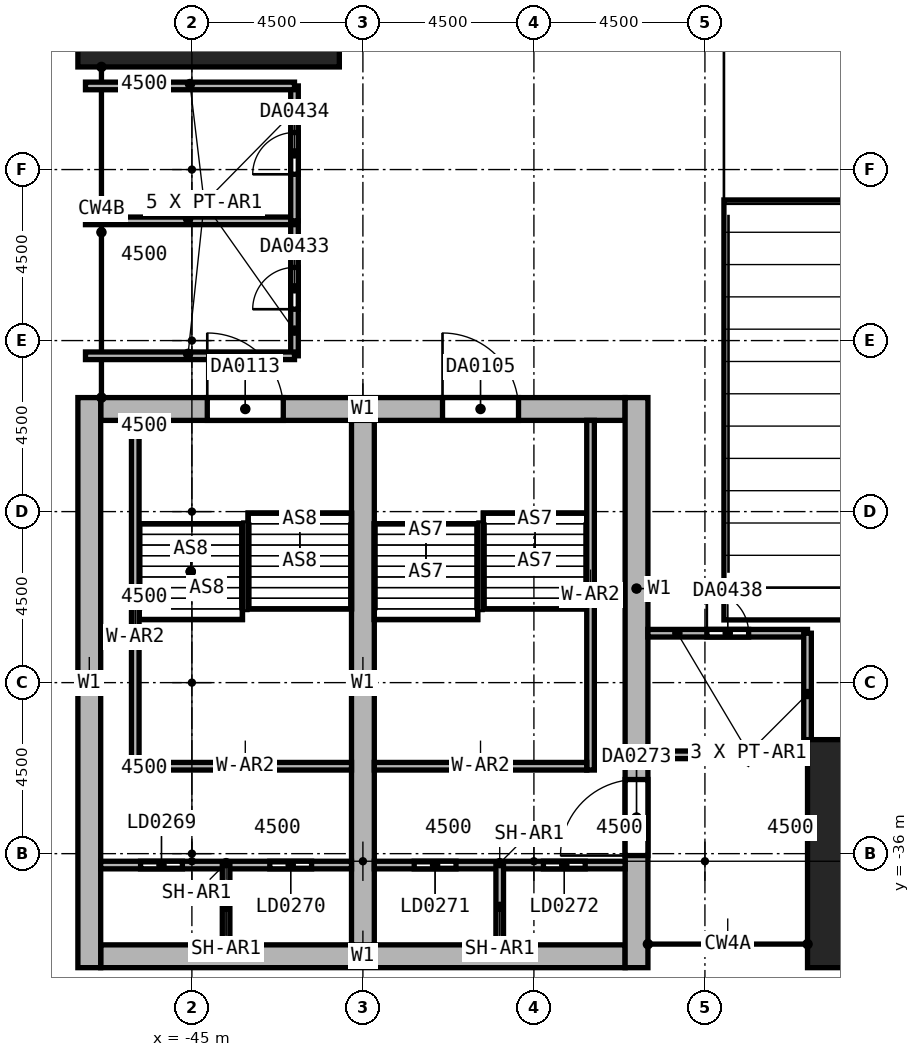
"""IFC4 building model, lengths in metres.
Left out: names, types, materials, properties, quantities, classifications, styles, units other than length and angle.
Written with IfcOpenShell. Run it as: python <this file> out.ifc"""

import sys

from ifc_helpers import new_model, si_unit, direction, frame, frame_2d, origin, origin_2d, place, context, subcontext, project, spatial, rectangle, extrude, element, fill, save


model = new_model("IFC4")
c1 = context("Model", 3, precision=1e-05, world=origin(), true_north=direction((0.0, 1.0)))
c2 = subcontext(c1, "Body", "Model", "MODEL_VIEW")
j1 = project(units=[si_unit("LENGTHUNIT", "METRE"), si_unit("PLANEANGLEUNIT", "RADIAN")], contexts=[c1])
p1 = place(None, origin())
s1 = spatial("IfcSite", under=j1, at=p1, CompositionType="ELEMENT")
p2 = place(p1, origin())
s2 = spatial("IfcBuilding", under=s1, at=p2, CompositionType="ELEMENT")
p3 = place(p2, frame((0.0, 0.0, 31.0)))
s3 = spatial("IfcBuildingStorey", under=s2, at=p3, CompositionType="ELEMENT", Elevation=31.0)
p4 = place(p3, frame((-27.0, -36.0, 0.0), z_axis=(0.0, 0.0, 1.0), x_axis=(1.0, 0.0, 0.0)))
e1 = element("IfcColumn", 1, at=p4, inside=s3, PredefinedType="COLUMN", context=c2, shape_type="SweptSolid", body=[
    extrude(rectangle(XDim=3.6, YDim=6.0, at=origin_2d()), origin(), (0.0, 0.0, 1.0), 6.0),
])
p5 = place(p3, frame((-44.56, -13.5, 0.0), z_axis=(0.0, 0.0, 1.0), x_axis=(0.0, -1.0, 0.0)))
e2 = element("IfcColumn", 2, at=p5, inside=s3, PredefinedType="COLUMN", context=c2, shape_type="SweptSolid", body=[
    extrude(rectangle(XDim=3.6, YDim=6.88, at=origin_2d()), origin(), (0.0, 0.0, 1.0), 6.0),
])
p6 = place(p3, frame((-47.4, -24.3, 0.0), z_axis=(0.0, 0.0, 1.0), x_axis=(1.0, 0.0, 0.0)))
e3 = element("IfcWall", 3, at=p6, inside=s3, PredefinedType="SHEAR", context=c2, shape_type="SweptSolid", body=[
    extrude(rectangle(XDim=13.8, YDim=0.6, at=frame_2d((6.9, 0.0))), origin(), (0.0, 0.0, 1.0), 6.0),
])
p7 = place(p6, frame((8.995, 0.0, 0.0)))
e4 = element("IfcOpeningElement", 4, at=p7, cuts=e3, PredefinedType="OPENING", context=c2, shape_type="SweptSolid", body=[
    extrude(rectangle(XDim=2.0, YDim=2.4, at=frame_2d((1.0, 1.2))), frame((0.0, 0.3, 0.0), z_axis=(0.0, -1.0, 0.0), x_axis=(1.0, 0.0, 0.0)), (0.0, 0.0, 1.0), 0.6),
])
p8 = place(p6, frame((2.805, 0.0, 0.0)))
e5 = element("IfcOpeningElement", 5, at=p8, cuts=e3, PredefinedType="OPENING", context=c2, shape_type="SweptSolid", body=[
    extrude(rectangle(XDim=2.0, YDim=2.4, at=frame_2d((1.0, 1.2))), frame((0.0, 0.3, 0.0), z_axis=(0.0, -1.0, 0.0), x_axis=(1.0, 0.0, 0.0)), (0.0, 0.0, 1.0), 0.6),
])
p9 = place(p3, frame((-47.4, -38.7, 0.0), z_axis=(0.0, 0.0, 1.0), x_axis=(1.0, 0.0, 0.0)))
e6 = element("IfcWall", 6, at=p9, inside=s3, PredefinedType="SHEAR", context=c2, shape_type="SweptSolid", body=[
    extrude(rectangle(XDim=13.8, YDim=0.6, at=frame_2d((6.9, 0.0))), origin(), (0.0, 0.0, 1.0), 6.0),
])
p10 = place(p3, frame((-47.7, -39.0, 0.0), z_axis=(0.0, 0.0, 1.0), x_axis=(0.0, 1.0, 0.0)))
e7 = element("IfcWall", 7, at=p10, inside=s3, PredefinedType="SHEAR", context=c2, shape_type="SweptSolid", body=[
    extrude(rectangle(XDim=15.0, YDim=0.6, at=frame_2d((7.5, 0.0))), origin(), (0.0, 0.0, 1.0), 6.0),
])
p11 = place(p3, frame((-33.3, -39.0, 0.0), z_axis=(0.0, 0.0, 1.0), x_axis=(0.0, 1.0, 0.0)))
e8 = element("IfcWall", 8, at=p11, inside=s3, PredefinedType="SHEAR", context=c2, shape_type="SweptSolid", body=[
    extrude(rectangle(XDim=15.0, YDim=0.6, at=frame_2d((7.5, 0.0))), origin(), (0.0, 0.0, 1.0), 6.0),
])
p12 = place(p11, frame((2.95, 0.0, 0.0)))
e9 = element("IfcOpeningElement", 9, at=p12, cuts=e8, PredefinedType="OPENING", context=c2, shape_type="SweptSolid", body=[
    extrude(rectangle(XDim=2.0, YDim=2.4, at=frame_2d((1.0, 1.2))), frame((0.0, 0.3, 0.0), z_axis=(0.0, -1.0, 0.0), x_axis=(1.0, 0.0, 0.0)), (0.0, 0.0, 1.0), 0.6),
])
p13 = place(p3, frame((-40.5, -38.4, 0.0), z_axis=(0.0, 0.0, 1.0), x_axis=(0.0, 1.0, 0.0)))
e10 = element("IfcWall", 10, at=p13, inside=s3, PredefinedType="SHEAR", context=c2, shape_type="SweptSolid", body=[
    extrude(rectangle(XDim=13.8, YDim=0.6, at=frame_2d((6.9, 0.0))), origin(), (0.0, 0.0, 1.0), 6.0),
])
p14 = place(p3, frame((-34.51, -33.8, 0.0), z_axis=(0.0, 0.0, 1.0), x_axis=(0.0, 1.0, 0.0)))
e11 = element("IfcWall", 11, at=p14, inside=s3, PredefinedType="SOLIDWALL", context=c2, shape_type="SweptSolid", body=[
    extrude(rectangle(XDim=9.2, YDim=0.2, at=frame_2d((4.6, 0.0))), origin(), (0.0, 0.0, 1.0), 6.0),
])
p15 = place(p3, frame((-40.2, -33.7, 0.0), z_axis=(0.0, 0.0, 1.0), x_axis=(1.0, 0.0, 0.0)))
e12 = element("IfcWall", 12, at=p15, inside=s3, PredefinedType="SOLIDWALL", context=c2, shape_type="SweptSolid", body=[
    extrude(rectangle(XDim=5.59, YDim=0.2, at=frame_2d((2.795, 0.0))), origin(), (0.0, 0.0, 1.0), 6.0),
])
p16 = place(p3, frame((-46.49, -33.8, 0.0), z_axis=(0.0, 0.0, 1.0), x_axis=(0.0, 1.0, 0.0)))
e13 = element("IfcWall", 13, at=p16, inside=s3, PredefinedType="SOLIDWALL", context=c2, shape_type="SweptSolid", body=[
    extrude(rectangle(XDim=9.2, YDim=0.2, at=frame_2d((4.6, 0.0))), origin(), (0.0, 0.0, 1.0), 6.0),
])
p17 = place(p3, frame((-46.39, -33.7, 0.0), z_axis=(0.0, 0.0, 1.0), x_axis=(1.0, 0.0, 0.0)))
e14 = element("IfcWall", 14, at=p17, inside=s3, PredefinedType="SOLIDWALL", context=c2, shape_type="SweptSolid", body=[
    extrude(rectangle(XDim=5.59, YDim=0.2, at=frame_2d((2.795, 0.0))), origin(), (0.0, 0.0, 1.0), 6.0),
])
p18 = place(p3, frame((-47.4, -36.3, 0.0), z_axis=(0.0, 0.0, 1.0), x_axis=(1.0, 0.0, 0.0)))
e15 = element("IfcWall", 15, at=p18, inside=s3, PredefinedType="SHEAR", context=c2, shape_type="SweptSolid", body=[
    extrude(rectangle(XDim=6.6, YDim=0.2, at=frame_2d((3.3, 0.0))), origin(), (0.0, 0.0, 1.0), 6.0),
])
p19 = place(p18, frame((1.05, 0.0, 0.0)))
e16 = element("IfcOpeningElement", 16, at=p19, cuts=e15, PredefinedType="OPENING", context=c2, shape_type="SweptSolid", body=[
    extrude(rectangle(XDim=1.1, YDim=2.4, at=frame_2d((0.55, 1.2))), frame((0.0, 0.1, 0.0), z_axis=(0.0, -1.0, 0.0), x_axis=(1.0, 0.0, 0.0)), (0.0, 0.0, 1.0), 0.2),
])
p20 = place(p18, frame((4.45, 0.0, 0.0)))
e17 = element("IfcOpeningElement", 17, at=p20, cuts=e15, PredefinedType="OPENING", context=c2, shape_type="SweptSolid", body=[
    extrude(rectangle(XDim=1.1, YDim=2.4, at=frame_2d((0.55, 1.2))), frame((0.0, 0.1, 0.0), z_axis=(0.0, -1.0, 0.0), x_axis=(1.0, 0.0, 0.0)), (0.0, 0.0, 1.0), 0.2),
])
p21 = place(p3, frame((-40.2, -36.3, 0.0), z_axis=(0.0, 0.0, 1.0), x_axis=(1.0, 0.0, 0.0)))
e18 = element("IfcWall", 18, at=p21, inside=s3, PredefinedType="SHEAR", context=c2, shape_type="SweptSolid", body=[
    extrude(rectangle(XDim=6.6, YDim=0.2, at=frame_2d((3.3, 0.0))), origin(), (0.0, 0.0, 1.0), 6.0),
])
p22 = place(p21, frame((1.05, 0.0, 0.0)))
e19 = element("IfcOpeningElement", 19, at=p22, cuts=e18, PredefinedType="OPENING", context=c2, shape_type="SweptSolid", body=[
    extrude(rectangle(XDim=1.1, YDim=2.4, at=frame_2d((0.55, 1.2))), frame((0.0, 0.1, 0.0), z_axis=(0.0, -1.0, 0.0), x_axis=(1.0, 0.0, 0.0)), (0.0, 0.0, 1.0), 0.2),
])
p23 = place(p21, frame((4.45, 0.0, 0.0)))
e20 = element("IfcOpeningElement", 20, at=p23, cuts=e18, PredefinedType="OPENING", context=c2, shape_type="SweptSolid", body=[
    extrude(rectangle(XDim=1.1, YDim=2.4, at=frame_2d((0.55, 1.2))), frame((0.0, 0.1, 0.0), z_axis=(0.0, -1.0, 0.0), x_axis=(1.0, 0.0, 0.0)), (0.0, 0.0, 1.0), 0.2),
])
for number, where, z_axis, x_axis in (
    (21, (-36.9, -38.4, 0.0), (0.0, 0.0, 1.0), (0.0, 1.0, 0.0)),
    (22, (-44.1, -38.4, 0.0), (0.0, 0.0, 1.0), (0.0, 1.0, 0.0)),
):
    element("IfcWall", number, at=place(p3, frame(where, z_axis=z_axis, x_axis=x_axis)), inside=s3, PredefinedType="SHEAR", context=c2, shape_type="SweptSolid", body=[
        extrude(rectangle(XDim=2.1, YDim=0.2, at=frame_2d((1.05, 0.0))), origin(), (0.0, 0.0, 1.0), 6.0),
    ])
p24 = place(p3, frame((-42.3, -22.9, 0.0), z_axis=(0.0, 0.0, 1.0), x_axis=(0.0, 1.0, 0.0)))
e23 = element("IfcWall", 23, at=p24, inside=s3, PredefinedType="PARTITIONING", context=c2, shape_type="SweptSolid", body=[
    extrude(rectangle(XDim=3.55, YDim=0.2, at=frame_2d((1.775, 0.0))), origin(), (0.0, 0.0, 1.0), 5.7),
])
p25 = place(p24, frame((1.225, 0.0, 0.0)))
e24 = element("IfcOpeningElement", 24, at=p25, cuts=e23, PredefinedType="OPENING", context=c2, shape_type="SweptSolid", body=[
    extrude(rectangle(XDim=1.1, YDim=2.4, at=frame_2d((0.55, 1.2))), frame((0.0, 0.1, 0.0), z_axis=(0.0, -1.0, 0.0), x_axis=(1.0, 0.0, 0.0)), (0.0, 0.0, 1.0), 0.2),
])
for number, where, z_axis, x_axis in (
    (25, (-42.3, -22.9, 0.0), (0.0, 0.0, 1.0), (-1.0, 0.0, 0.0)),
    (26, (-47.8, -19.35, 0.0), (0.0, 0.0, 1.0), (1.0, 0.0, 0.0)),
):
    element("IfcWall", number, at=place(p3, frame(where, z_axis=z_axis, x_axis=x_axis)), inside=s3, PredefinedType="PARTITIONING", context=c2, shape_type="SweptSolid", body=[
        extrude(rectangle(XDim=5.5, YDim=0.2, at=frame_2d((2.75, 0.0))), origin(), (0.0, 0.0, 1.0), 5.7),
    ])
p26 = place(p3, frame((-42.3, -19.35, 0.0), z_axis=(0.0, 0.0, 1.0), x_axis=(0.0, 1.0, 0.0)))
e27 = element("IfcWall", 27, at=p26, inside=s3, PredefinedType="PARTITIONING", context=c2, shape_type="SweptSolid", body=[
    extrude(rectangle(XDim=3.55, YDim=0.2, at=frame_2d((1.775, 0.0))), origin(), (0.0, 0.0, 1.0), 5.7),
])
p27 = place(p26, frame((1.225, 0.0, 0.0)))
e28 = element("IfcOpeningElement", 28, at=p27, cuts=e27, PredefinedType="OPENING", context=c2, shape_type="SweptSolid", body=[
    extrude(rectangle(XDim=1.1, YDim=2.4, at=frame_2d((0.55, 1.2))), frame((0.0, 0.1, 0.0), z_axis=(0.0, -1.0, 0.0), x_axis=(1.0, 0.0, 0.0)), (0.0, 0.0, 1.0), 0.2),
])
p28 = place(p3, frame((-42.3, -15.8, 0.0), z_axis=(0.0, 0.0, 1.0), x_axis=(-1.0, 0.0, 0.0)))
e29 = element("IfcWall", 29, at=p28, inside=s3, PredefinedType="PARTITIONING", context=c2, shape_type="SweptSolid", body=[
    extrude(rectangle(XDim=5.5, YDim=0.2, at=frame_2d((2.75, 0.0))), origin(), (0.0, 0.0, 1.0), 5.7),
])
p29 = place(p3, frame((-33.0, -30.2, 0.0), z_axis=(0.0, 0.0, 1.0), x_axis=(1.0, 0.0, 0.0)))
e30 = element("IfcWall", 30, at=p29, inside=s3, PredefinedType="PARTITIONING", context=c2, shape_type="SweptSolid", body=[
    extrude(rectangle(XDim=4.2, YDim=0.2, at=frame_2d((2.1, 0.0))), origin(), (0.0, 0.0, 1.0), 5.7),
])
p30 = place(p29, frame((1.55, 0.0, 0.0)))
e31 = element("IfcOpeningElement", 31, at=p30, cuts=e30, PredefinedType="OPENING", context=c2, shape_type="SweptSolid", body=[
    extrude(rectangle(XDim=1.1, YDim=2.4, at=frame_2d((0.55, 1.2))), frame((0.0, 0.1, 0.0), z_axis=(0.0, -1.0, 0.0), x_axis=(1.0, 0.0, 0.0)), (0.0, 0.0, 1.0), 0.2),
])
p31 = place(p3, frame((-28.8, -33.4, 0.0), z_axis=(0.0, 0.0, 1.0), x_axis=(0.0, 1.0, 0.0)))
e32 = element("IfcWall", 32, at=p31, inside=s3, PredefinedType="PARTITIONING", context=c2, shape_type="SweptSolid", body=[
    extrude(rectangle(XDim=3.2, YDim=0.2, at=frame_2d((1.6, 0.0))), origin(), (0.0, 0.0, 1.0), 5.7),
])
p32 = place(p3, frame((-33.0, -33.4, 0.0), z_axis=(0.0, 0.0, 1.0), x_axis=(1.0, 0.0, 0.0)))
e33 = element("IfcWall", 33, at=p32, inside=s3, PredefinedType="PARTITIONING", context=c2, shape_type="SweptSolid", body=[
    extrude(rectangle(XDim=4.2, YDim=0.2, at=frame_2d((2.1, 0.0))), origin(), (0.0, 0.0, 1.0), 5.7),
])
p33 = place(p7, frame((2.0, 0.0, 0.0), z_axis=(0.0, 0.0, 1.0), x_axis=(-1.0, 0.0, 0.0)))
e34 = element("IfcDoor", 34, at=p33, inside=s3, OperationType="DOUBLE_DOOR_SINGLE_SWING", PredefinedType="DOOR", context=c2, shape_type="SweptSolid", body=[
    extrude(rectangle(XDim=2.0, YDim=2.4, at=frame_2d((1.0, 1.2))), frame((0.0, 0.025, 0.0), z_axis=(0.0, -1.0, 0.0), x_axis=(1.0, 0.0, 0.0)), (0.0, 0.0, 1.0), 0.05),
])
fill(e4, e34)
p34 = place(p8, frame((2.0, 0.0, 0.0), z_axis=(0.0, 0.0, 1.0), x_axis=(-1.0, 0.0, 0.0)))
e35 = element("IfcDoor", 35, at=p34, inside=s3, OperationType="DOUBLE_DOOR_SINGLE_SWING", PredefinedType="DOOR", context=c2, shape_type="SweptSolid", body=[
    extrude(rectangle(XDim=2.0, YDim=2.4, at=frame_2d((1.0, 1.2))), frame((0.0, 0.025, 0.0), z_axis=(0.0, -1.0, 0.0), x_axis=(1.0, 0.0, 0.0)), (0.0, 0.0, 1.0), 0.05),
])
fill(e5, e35)
p35 = place(p19, frame((1.1, 0.0, 0.0), z_axis=(0.0, 0.0, 1.0), x_axis=(-1.0, 0.0, 0.0)))
e36 = element("IfcDoor", 36, at=p35, inside=s3, OperationType="DOUBLE_DOOR_SLIDING", PredefinedType="DOOR", context=c2, shape_type="SweptSolid", body=[
    extrude(rectangle(XDim=1.1, YDim=2.4, at=frame_2d((0.55, 1.2))), frame((0.0, 0.025, 0.0), z_axis=(0.0, -1.0, 0.0), x_axis=(1.0, 0.0, 0.0)), (0.0, 0.0, 1.0), 0.05),
])
fill(e16, e36)
p36 = place(p20, frame((1.1, 0.0, 0.0), z_axis=(0.0, 0.0, 1.0), x_axis=(-1.0, 0.0, 0.0)))
e37 = element("IfcDoor", 37, at=p36, inside=s3, OperationType="DOUBLE_DOOR_SLIDING", PredefinedType="DOOR", context=c2, shape_type="SweptSolid", body=[
    extrude(rectangle(XDim=1.1, YDim=2.4, at=frame_2d((0.55, 1.2))), frame((0.0, 0.025, 0.0), z_axis=(0.0, -1.0, 0.0), x_axis=(1.0, 0.0, 0.0)), (0.0, 0.0, 1.0), 0.05),
])
fill(e17, e37)
p37 = place(p22, frame((1.1, 0.0, 0.0), z_axis=(0.0, 0.0, 1.0), x_axis=(-1.0, 0.0, 0.0)))
e38 = element("IfcDoor", 38, at=p37, inside=s3, OperationType="DOUBLE_DOOR_SLIDING", PredefinedType="DOOR", context=c2, shape_type="SweptSolid", body=[
    extrude(rectangle(XDim=1.1, YDim=2.4, at=frame_2d((0.55, 1.2))), frame((0.0, 0.025, 0.0), z_axis=(0.0, -1.0, 0.0), x_axis=(1.0, 0.0, 0.0)), (0.0, 0.0, 1.0), 0.05),
])
fill(e19, e38)
p38 = place(p23, frame((1.1, 0.0, 0.0), z_axis=(0.0, 0.0, 1.0), x_axis=(-1.0, 0.0, 0.0)))
e39 = element("IfcDoor", 39, at=p38, inside=s3, OperationType="DOUBLE_DOOR_SLIDING", PredefinedType="DOOR", context=c2, shape_type="SweptSolid", body=[
    extrude(rectangle(XDim=1.1, YDim=2.4, at=frame_2d((0.55, 1.2))), frame((0.0, 0.025, 0.0), z_axis=(0.0, -1.0, 0.0), x_axis=(1.0, 0.0, 0.0)), (0.0, 0.0, 1.0), 0.05),
])
fill(e20, e39)
p39 = place(p12, origin())
e40 = element("IfcDoor", 40, at=p39, inside=s3, OperationType="DOUBLE_DOOR_SINGLE_SWING", PredefinedType="DOOR", context=c2, shape_type="SweptSolid", body=[
    extrude(rectangle(XDim=2.0, YDim=2.4, at=frame_2d((1.0, 1.2))), frame((0.0, 0.025, 0.0), z_axis=(0.0, -1.0, 0.0), x_axis=(1.0, 0.0, 0.0)), (0.0, 0.0, 1.0), 0.05),
])
fill(e9, e40)
p40 = place(p25, origin())
e41 = element("IfcDoor", 41, at=p40, inside=s3, OperationType="DOUBLE_DOOR_SINGLE_SWING", PredefinedType="DOOR", context=c2, shape_type="SweptSolid", body=[
    extrude(rectangle(XDim=1.1, YDim=2.4, at=frame_2d((0.55, 1.2))), frame((0.0, 0.025, 0.0), z_axis=(0.0, -1.0, 0.0), x_axis=(1.0, 0.0, 0.0)), (0.0, 0.0, 1.0), 0.05),
])
fill(e24, e41)
p41 = place(p27, origin())
e42 = element("IfcDoor", 42, at=p41, inside=s3, OperationType="DOUBLE_DOOR_SINGLE_SWING", PredefinedType="DOOR", context=c2, shape_type="SweptSolid", body=[
    extrude(rectangle(XDim=1.1, YDim=2.4, at=frame_2d((0.55, 1.2))), frame((0.0, 0.025, 0.0), z_axis=(0.0, -1.0, 0.0), x_axis=(1.0, 0.0, 0.0)), (0.0, 0.0, 1.0), 0.05),
])
fill(e28, e42)
p42 = place(p30, origin())
e43 = element("IfcDoor", 43, at=p42, inside=s3, OperationType="DOUBLE_DOOR_SINGLE_SWING", PredefinedType="DOOR", context=c2, shape_type="SweptSolid", body=[
    extrude(rectangle(XDim=1.1, YDim=2.4, at=frame_2d((0.55, 1.2))), frame((0.0, 0.025, 0.0), z_axis=(0.0, -1.0, 0.0), x_axis=(1.0, 0.0, 0.0)), (0.0, 0.0, 1.0), 0.05),
])
fill(e31, e43)
save(model, sys.argv[1])
